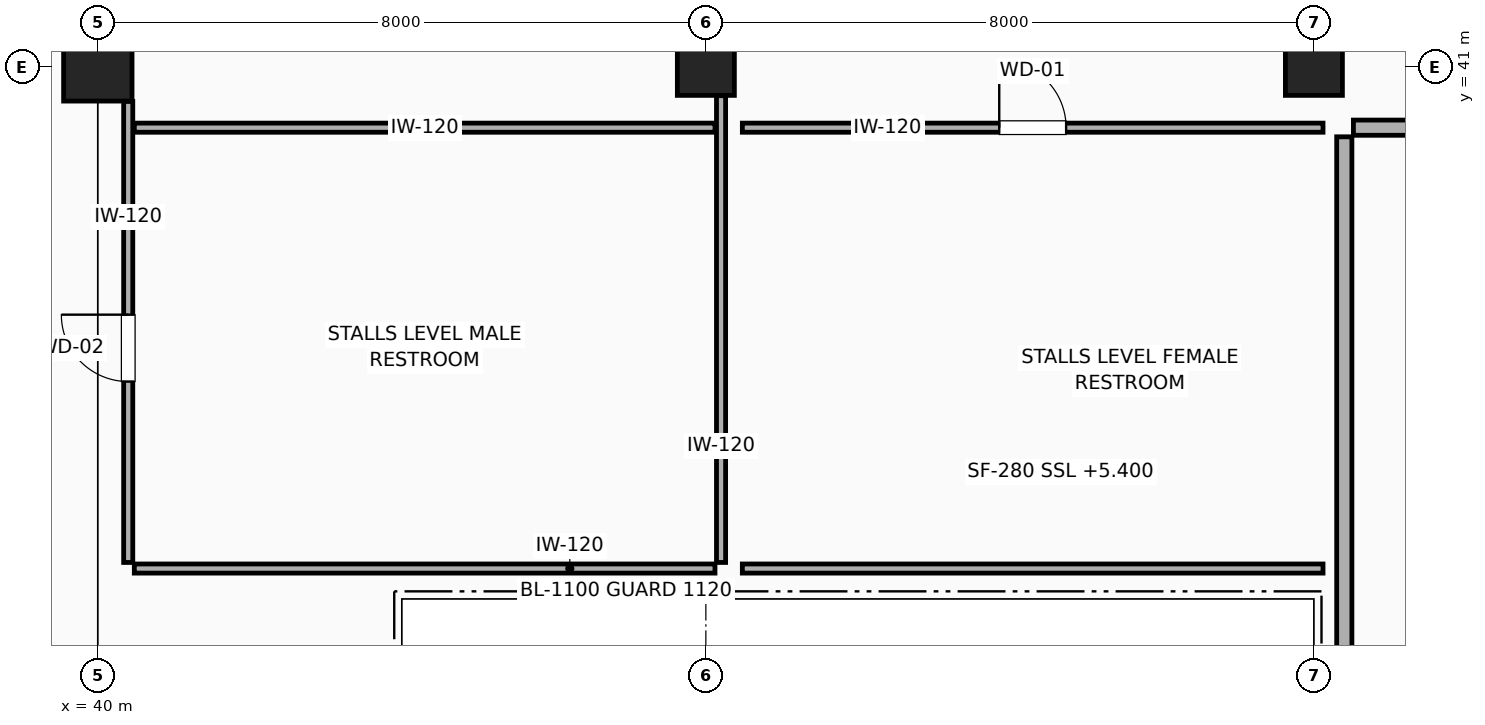
"""IFC4 building model, lengths in metres.
Left out: names, types, materials, properties, quantities, classifications, styles, units other than length and angle.
Written with IfcOpenShell. Run it as: python <this file> out.ifc"""

import sys

from ifc_helpers import new_model, si_unit, direction, frame, frame_2d, origin, origin_2d, place, context, subcontext, project, spatial, rectangle, extrude, element, fill, save


model = new_model("IFC4")
c1 = context("Model", 3, precision=1e-05, world=origin(), true_north=direction((0.0, 1.0)))
c2 = subcontext(c1, "Body", "Model", "MODEL_VIEW")
j1 = project(units=[si_unit("LENGTHUNIT", "METRE"), si_unit("PLANEANGLEUNIT", "RADIAN")], contexts=[c1])
p1 = place(None, origin())
s1 = spatial("IfcSite", under=j1, at=p1, CompositionType="ELEMENT")
p2 = place(p1, origin())
s2 = spatial("IfcBuilding", under=s1, at=p2, CompositionType="ELEMENT")
p3 = place(p2, frame((0.0, 0.0, 5.4)))
s3 = spatial("IfcBuildingStorey", under=s2, at=p3, CompositionType="ELEMENT", Elevation=5.4)
p4 = place(p3, frame((40.0, 41.0, 0.0), z_axis=(0.0, 0.0, 1.0), x_axis=(1.0, 0.0, 0.0)))
e1 = element("IfcColumn", 1, at=p4, inside=s3, PredefinedType="COLUMN", context=c2, shape_type="SweptSolid", body=[
    extrude(rectangle(XDim=0.9, YDim=0.9, at=origin_2d()), origin(), (0.0, 0.0, 1.0), 4.8),
])
for number, where, z_axis, x_axis in (
    (2, (48.0, 41.0, 0.0), (0.0, 0.0, 1.0), (1.0, 0.0, 0.0)),
    (3, (56.0, 41.0, 0.0), (0.0, 0.0, 1.0), (1.0, 0.0, 0.0)),
):
    element("IfcColumn", number, at=place(p3, frame(where, z_axis=z_axis, x_axis=x_axis)), inside=s3, PredefinedType="COLUMN", context=c2, shape_type="SweptSolid", body=[
        extrude(rectangle(XDim=0.75, YDim=0.75, at=origin_2d()), origin(), (0.0, 0.0, 1.0), 4.8),
    ])
p5 = place(p3, frame((56.52, 40.2, 0.0), z_axis=(0.0, 0.0, 1.0), x_axis=(1.0, 0.0, 0.0)))
e4 = element("IfcWall", 4, at=p5, inside=s3, PredefinedType="PARTITIONING", context=c2, shape_type="SweptSolid", body=[
    extrude(rectangle(XDim=1.81, YDim=0.2, at=frame_2d((0.905, 0.0))), origin(), (0.0, 0.0, 1.0), 4.53),
])
p6 = place(p3, frame((56.4, 32.39, 0.0), z_axis=(0.0, 0.0, 1.0), x_axis=(0.0, 1.0, 0.0)))
e5 = element("IfcWall", 5, at=p6, inside=s3, PredefinedType="PARTITIONING", context=c2, shape_type="SweptSolid", body=[
    extrude(rectangle(XDim=7.69, YDim=0.2, at=frame_2d((3.845, 0.0))), origin(), (0.0, 0.0, 1.0), 3.67),
])
p7 = place(p3, frame((40.48, 40.2, 0.0), z_axis=(0.0, 0.0, 1.0), x_axis=(1.0, 0.0, 0.0)))
e6 = element("IfcWall", 6, at=p7, inside=s3, PredefinedType="PARTITIONING", context=c2, shape_type="SweptSolid", body=[
    extrude(rectangle(XDim=7.64, YDim=0.12, at=frame_2d((3.82, 0.0))), origin(), (0.0, 0.0, 1.0), 4.53),
])
p8 = place(p3, frame((48.2, 40.621, 0.0), z_axis=(0.0, 0.0, 1.0), x_axis=(0.0, -1.0, 0.0)))
e7 = element("IfcWall", 7, at=p8, inside=s3, PredefinedType="PARTITIONING", context=c2, shape_type="SweptSolid", body=[
    extrude(rectangle(XDim=6.141, YDim=0.12, at=frame_2d((3.071, 0.0))), origin(), (0.0, 0.0, 1.0), 4.53),
])
p9 = place(p3, frame((48.12, 34.4, 0.0), z_axis=(0.0, 0.0, 1.0), x_axis=(-1.0, 0.0, 0.0)))
e8 = element("IfcWall", 8, at=p9, inside=s3, PredefinedType="PARTITIONING", context=c2, shape_type="SweptSolid", body=[
    extrude(rectangle(XDim=7.64, YDim=0.12, at=frame_2d((3.82, 0.0))), origin(), (0.0, 0.0, 1.0), 4.53),
])
p10 = place(p3, frame((40.4, 34.48, 0.0), z_axis=(0.0, 0.0, 1.0), x_axis=(0.0, 1.0, 0.0)))
e9 = element("IfcWall", 9, at=p10, inside=s3, PredefinedType="PARTITIONING", context=c2, shape_type="SweptSolid", body=[
    extrude(rectangle(XDim=6.066, YDim=0.12, at=frame_2d((3.033, 0.0))), origin(), (0.0, 0.0, 1.0), 4.53),
])
p11 = place(p10, frame((2.38, 0.0, 0.0)))
e10 = element("IfcOpeningElement", 10, at=p11, cuts=e9, PredefinedType="OPENING", context=c2, shape_type="SweptSolid", body=[
    extrude(rectangle(XDim=0.88, YDim=2.1, at=frame_2d((0.44, 1.05))), frame((0.0, 0.07, 0.0), z_axis=(0.0, -1.0, 0.0), x_axis=(1.0, 0.0, 0.0)), (0.0, 0.0, 1.0), 0.14),
])
p12 = place(p3, frame((48.48, 40.2, 0.0), z_axis=(0.0, 0.0, 1.0), x_axis=(1.0, 0.0, 0.0)))
e11 = element("IfcWall", 11, at=p12, inside=s3, PredefinedType="PARTITIONING", context=c2, shape_type="SweptSolid", body=[
    extrude(rectangle(XDim=7.64, YDim=0.12, at=frame_2d((3.82, 0.0))), origin(), (0.0, 0.0, 1.0), 4.53),
])
p13 = place(p12, frame((3.38, 0.0, 0.0)))
e12 = element("IfcOpeningElement", 12, at=p13, cuts=e11, PredefinedType="OPENING", context=c2, shape_type="SweptSolid", body=[
    extrude(rectangle(XDim=0.88, YDim=2.1, at=frame_2d((0.44, 1.05))), frame((0.0, 0.07, 0.0), z_axis=(0.0, -1.0, 0.0), x_axis=(1.0, 0.0, 0.0)), (0.0, 0.0, 1.0), 0.14),
])
p14 = place(p3, frame((56.12, 34.4, 0.0), z_axis=(0.0, 0.0, 1.0), x_axis=(-1.0, 0.0, 0.0)))
e13 = element("IfcWall", 13, at=p14, inside=s3, PredefinedType="PARTITIONING", context=c2, shape_type="SweptSolid", body=[
    extrude(rectangle(XDim=7.64, YDim=0.12, at=frame_2d((3.82, 0.0))), origin(), (0.0, 0.0, 1.0), 4.53),
])
p15 = place(p11, origin())
e14 = element("IfcDoor", 14, at=p15, inside=s3, OperationType="SINGLE_SWING_RIGHT", PredefinedType="DOOR", context=c2, shape_type="SweptSolid", body=[
    extrude(rectangle(XDim=0.88, YDim=2.1, at=frame_2d((0.44, 1.05))), frame((0.0, 0.025, 0.0), z_axis=(0.0, -1.0, 0.0), x_axis=(1.0, 0.0, 0.0)), (0.0, 0.0, 1.0), 0.05),
])
fill(e10, e14)
p16 = place(p13, origin())
e15 = element("IfcDoor", 15, at=p16, inside=s3, OperationType="SINGLE_SWING_LEFT", PredefinedType="DOOR", context=c2, shape_type="SweptSolid", body=[
    extrude(rectangle(XDim=0.88, YDim=2.1, at=frame_2d((0.44, 1.05))), frame((0.0, 0.025, 0.0), z_axis=(0.0, -1.0, 0.0), x_axis=(1.0, 0.0, 0.0)), (0.0, 0.0, 1.0), 0.05),
])
fill(e12, e15)
save(model, sys.argv[1])
